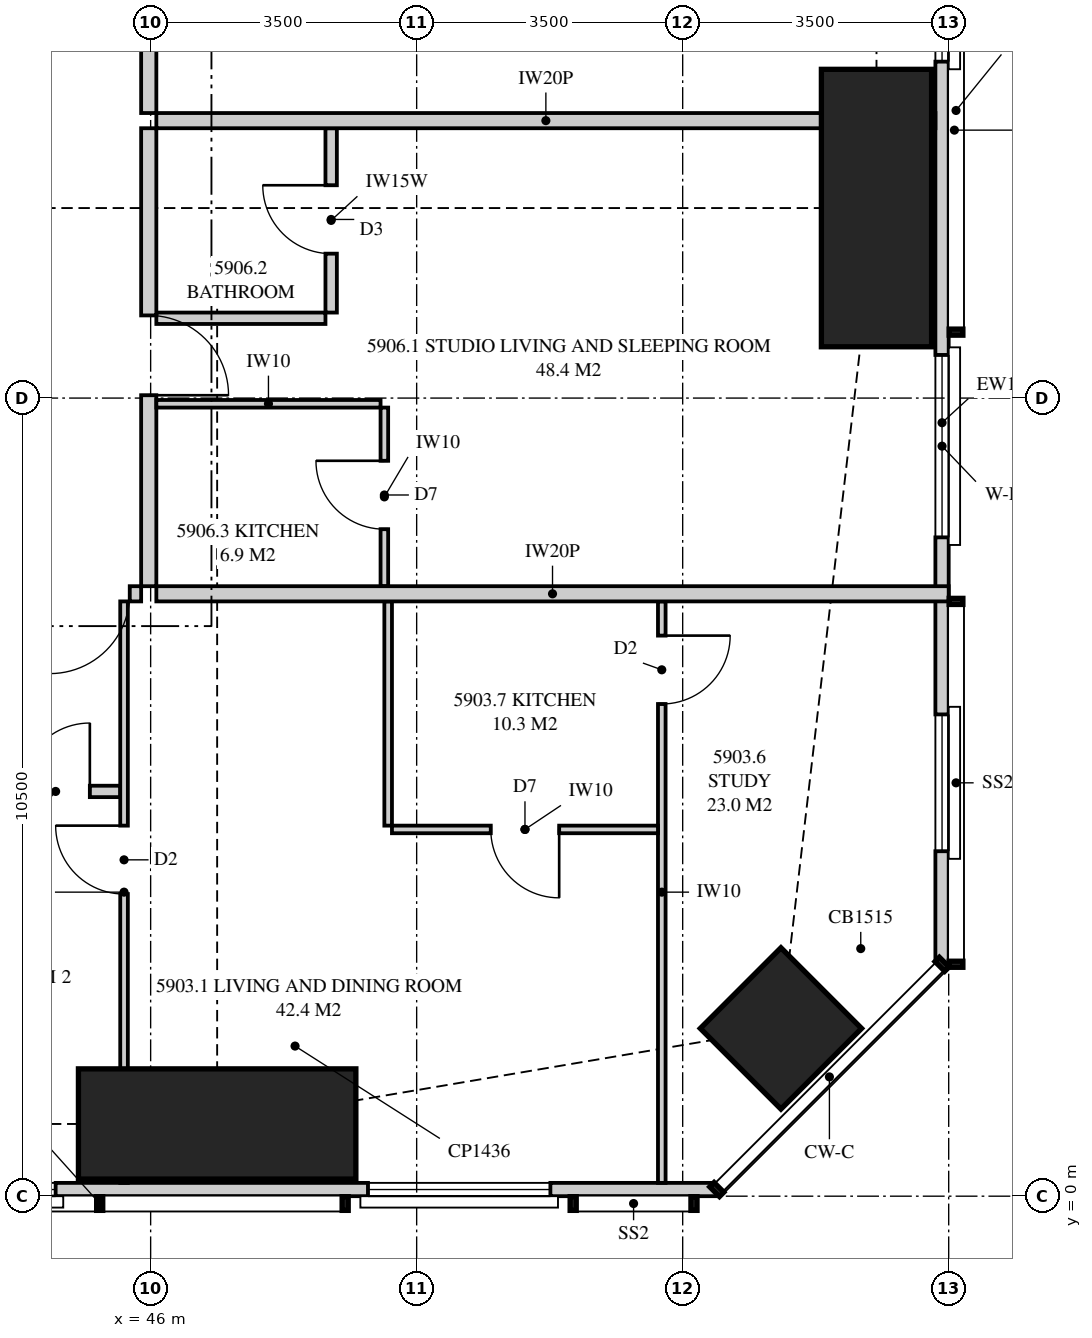
"""IFC4 building model, lengths in metres.
Left out: names, types, materials, properties, quantities, classifications, styles, units other than length and angle.
Written with IfcOpenShell. Run it as: python <this file> out.ifc"""

import sys

from ifc_helpers import new_model, si_unit, direction, frame, frame_2d, origin, origin_2d, place, context, subcontext, project, spatial, polyline, rectangle, hollow_rectangle, outline, extrude, element, fill, save


model = new_model("IFC4")
c1 = context("Model", 3, precision=1e-05, world=origin(), true_north=direction((0.0, 1.0)))
c2 = subcontext(c1, "Body", "Model", "MODEL_VIEW")
j1 = project(units=[si_unit("LENGTHUNIT", "METRE"), si_unit("PLANEANGLEUNIT", "RADIAN")], contexts=[c1])
p1 = place(None, origin())
s1 = spatial("IfcSite", under=j1, at=p1, CompositionType="ELEMENT")
p2 = place(p1, origin())
s2 = spatial("IfcBuilding", under=s1, at=p2, CompositionType="ELEMENT")
p3 = place(p2, frame((0.0, 0.0, 217.95)))
s3 = spatial("IfcBuildingStorey", under=s2, at=p3, CompositionType="ELEMENT", Elevation=217.95)
p4 = place(p3, frame((46.875, 0.95, 0.0), z_axis=(0.0, 0.0, 1.0), x_axis=(0.0, 1.0, 0.0)))
e1 = element("IfcColumn", 1, at=p4, inside=s3, PredefinedType="COLUMN", context=c2, shape_type="SweptSolid", body=[
    extrude(rectangle(XDim=1.45, YDim=3.65, at=origin_2d()), origin(), (0.0, 0.0, 1.0), 3.5),
])
p5 = place(p3, frame((54.293, 2.207, 0.0), z_axis=(0.0, 0.0, 1.0), x_axis=(-0.707106781187, 0.707106781187, 0.0)))
e2 = element("IfcColumn", 2, at=p5, inside=s3, PredefinedType="COLUMN", context=c2, shape_type="SweptSolid", body=[
    extrude(hollow_rectangle(XDim=1.5, YDim=1.5, WallThickness=0.125, at=origin_2d()), origin(), (0.0, 0.0, 1.0), 3.5),
])
p6 = place(p3, frame((55.55, 13.0, 0.0), z_axis=(0.0, 0.0, 1.0), x_axis=(1.0, 0.0, 0.0)))
e3 = element("IfcColumn", 3, at=p6, inside=s3, PredefinedType="COLUMN", context=c2, shape_type="SweptSolid", body=[
    extrude(rectangle(XDim=1.45, YDim=3.65, at=origin_2d()), origin(), (0.0, 0.0, 1.0), 3.5),
])
p7 = place(p3, frame((35.35, 0.087, 0.0), z_axis=(0.0, 0.0, 1.0), x_axis=(1.0, 0.0, 0.0)))
e4 = element("IfcWall", 4, at=p7, inside=s3, PredefinedType="SOLIDWALL", context=c2, shape_type="SweptSolid", body=[
    extrude(outline(polyline([(0.0, 0.0), (18.099, 0.0), (18.099, 3.26), (11.74, 3.26), (11.74, 2.3), (11.656, 2.3), (11.656, 3.26), (11.525, 3.26), (11.525, 2.3), (0.0, 2.3), (0.0, 0.0)])), frame((0.0, 0.087, 0.0), z_axis=(0.0, -1.0, 0.0), x_axis=(1.0, 0.0, 0.0)), (0.0, 0.0, 1.0), 0.175),
])
p8 = place(p7, frame((4.0, 0.0, 0.4)))
e5 = element("IfcOpeningElement", 5, at=p8, cuts=e4, PredefinedType="OPENING", context=c2, shape_type="SweptSolid", body=[
    extrude(rectangle(XDim=1.8, YDim=1.85, at=frame_2d((0.9, 0.925))), frame((0.0, 0.097, 0.0), z_axis=(0.0, -1.0, 0.0), x_axis=(1.0, 0.0, 0.0)), (0.0, 0.0, 1.0), 0.195),
])
p9 = place(p7, frame((7.6, 0.0, 0.4)))
e6 = element("IfcOpeningElement", 6, at=p9, cuts=e4, PredefinedType="OPENING", context=c2, shape_type="SweptSolid", body=[
    extrude(rectangle(XDim=1.8, YDim=1.85, at=frame_2d((0.9, 0.925))), frame((0.0, 0.097, 0.0), z_axis=(0.0, -1.0, 0.0), x_axis=(1.0, 0.0, 0.0)), (0.0, 0.0, 1.0), 0.195),
])
p10 = place(p7, frame((13.51, 0.0, 0.4)))
e7 = element("IfcOpeningElement", 7, at=p10, cuts=e4, PredefinedType="OPENING", context=c2, shape_type="SweptSolid", body=[
    extrude(rectangle(XDim=2.4, YDim=1.85, at=frame_2d((1.2, 0.925))), frame((0.0, 0.097, 0.0), z_axis=(0.0, -1.0, 0.0), x_axis=(1.0, 0.0, 0.0)), (0.0, 0.0, 1.0), 0.195),
])
p11 = place(p3, frame((56.413, 3.051, 0.0), z_axis=(0.0, 0.0, 1.0), x_axis=(0.0, 1.0, 0.0)))
e8 = element("IfcWall", 8, at=p11, inside=s3, PredefinedType="SOLIDWALL", context=c2, shape_type="SweptSolid", body=[
    extrude(outline(polyline([(0.0, 0.0), (14.249, 0.0), (14.249, 2.3), (9.949, 2.3), (9.949, 3.26), (9.858, 3.26), (9.858, 2.3), (9.688, 2.3), (9.688, 3.26), (0.0, 3.26), (0.0, 0.0)])), frame((0.0, 0.087, 0.0), z_axis=(0.0, -1.0, 0.0), x_axis=(1.0, 0.0, 0.0)), (0.0, 0.0, 1.0), 0.175),
])
p12 = place(p11, frame((1.487, 0.0, 0.4)))
e9 = element("IfcOpeningElement", 9, at=p12, cuts=e8, PredefinedType="OPENING", context=c2, shape_type="SweptSolid", body=[
    extrude(rectangle(XDim=1.8, YDim=1.85, at=frame_2d((0.9, 0.925))), frame((0.0, 0.097, 0.0), z_axis=(0.0, -1.0, 0.0), x_axis=(1.0, 0.0, 0.0)), (0.0, 0.0, 1.0), 0.195),
])
p13 = place(p11, frame((5.616, 0.0, 0.4)))
e10 = element("IfcOpeningElement", 10, at=p13, cuts=e8, PredefinedType="OPENING", context=c2, shape_type="SweptSolid", body=[
    extrude(rectangle(XDim=2.4, YDim=1.85, at=frame_2d((1.2, 0.925))), frame((0.0, 0.097, 0.0), z_axis=(0.0, -1.0, 0.0), x_axis=(1.0, 0.0, 0.0)), (0.0, 0.0, 1.0), 0.195),
])
p14 = place(p11, frame((11.875, 0.0, 0.4)))
e11 = element("IfcOpeningElement", 11, at=p14, cuts=e8, PredefinedType="OPENING", context=c2, shape_type="SweptSolid", body=[
    extrude(rectangle(XDim=1.8, YDim=1.85, at=frame_2d((0.9, 0.925))), frame((0.0, 0.097, 0.0), z_axis=(0.0, -1.0, 0.0), x_axis=(1.0, 0.0, 0.0)), (0.0, 0.0, 1.0), 0.195),
])
p15 = place(p3, frame((38.55, 7.925, 0.0), z_axis=(0.0, 0.0, 1.0), x_axis=(1.0, 0.0, 0.0)))
e12 = element("IfcWall", 12, at=p15, inside=s3, PredefinedType="PARTITIONING", context=c2, shape_type="SweptSolid", body=[
    extrude(outline(polyline([(0.0, 0.0), (7.325, 0.0), (7.325, 3.26), (7.325, 2.66), (7.015, 2.66), (7.015, 3.26), (0.01, 3.26), (0.01, 2.66), (0.0, 2.66), (0.0, 3.26), (0.0, 0.0)])), frame((0.0, 0.1, 0.0), z_axis=(0.0, -1.0, 0.0), x_axis=(1.0, 0.0, 0.0)), (0.0, 0.0, 1.0), 0.2),
])
p16 = place(p15, frame((6.125, 0.0, 0.0)))
e13 = element("IfcOpeningElement", 13, at=p16, cuts=e12, PredefinedType="OPENING", context=c2, shape_type="SweptSolid", body=[
    extrude(rectangle(XDim=1.05, YDim=2.2, at=frame_2d((0.525, 1.1))), frame((0.0, 0.11, 0.0), z_axis=(0.0, -1.0, 0.0), x_axis=(1.0, 0.0, 0.0)), (0.0, 0.0, 1.0), 0.22),
])
p17 = place(p3, frame((45.65, 0.175, 0.0), z_axis=(0.0, 0.0, 1.0), x_axis=(0.0, 1.0, 0.0)))
e14 = element("IfcWall", 14, at=p17, inside=s3, PredefinedType="PARTITIONING", context=c2, shape_type="SweptSolid", body=[
    extrude(outline(polyline([(0.529, 2.3), (0.0, 2.3), (0.0, 0.0), (0.529, 0.0), (0.529, 0.13), (1.021, 0.13), (1.021, 0.0), (7.65, 0.0), (7.65, 2.66), (1.635, 2.66), (1.635, 2.3), (1.021, 2.3), (1.021, 2.02), (0.529, 2.02), (0.529, 2.3)])), frame((0.0, 0.05, 0.0), z_axis=(0.0, -1.0, 0.0), x_axis=(1.0, 0.0, 0.0)), (0.0, 0.0, 1.0), 0.1),
])
p18 = place(p17, frame((3.8, 0.0, 0.0)))
e15 = element("IfcOpeningElement", 15, at=p18, cuts=e14, PredefinedType="OPENING", context=c2, shape_type="SweptSolid", body=[
    extrude(rectangle(XDim=0.9, YDim=2.1, at=frame_2d((0.45, 1.05))), frame((0.0, 0.06, 0.0), z_axis=(0.0, -1.0, 0.0), x_axis=(1.0, 0.0, 0.0)), (0.0, 0.0, 1.0), 0.12),
])
p19 = place(p3, frame((42.1, 5.325, 0.0), z_axis=(0.0, 0.0, 1.0), x_axis=(1.0, 0.0, 0.0)))
e16 = element("IfcWall", 16, at=p19, inside=s3, PredefinedType="PLUMBINGWALL", context=c2, shape_type="SweptSolid", body=[
    extrude(outline(polyline([(0.0, 0.0), (3.5, 0.0), (3.5, 3.26), (3.5, 2.66), (3.49, 2.66), (3.49, 3.26), (0.0, 3.26), (0.0, 0.0)])), frame((0.0, 0.075, 0.0), z_axis=(0.0, -1.0, 0.0), x_axis=(1.0, 0.0, 0.0)), (0.0, 0.0, 1.0), 0.15),
])
p20 = place(p19, frame((2.2, 0.0, 0.0)))
e17 = element("IfcOpeningElement", 17, at=p20, cuts=e16, PredefinedType="OPENING", context=c2, shape_type="SweptSolid", body=[
    extrude(rectangle(XDim=0.9, YDim=2.1, at=frame_2d((0.45, 1.05))), frame((0.0, 0.085, 0.0), z_axis=(0.0, -1.0, 0.0), x_axis=(1.0, 0.0, 0.0)), (0.0, 0.0, 1.0), 0.17),
])
p21 = place(p3, frame((52.725, 0.175, 0.0), z_axis=(0.0, 0.0, 1.0), x_axis=(0.0, 1.0, 0.0)))
e18 = element("IfcWall", 18, at=p21, inside=s3, PredefinedType="PARTITIONING", context=c2, shape_type="SweptSolid", body=[
    extrude(outline(polyline([(0.0, 0.0), (7.65, 0.0), (7.65, 3.26), (2.639, 3.26), (2.639, 2.3), (0.894, 2.3), (0.894, 3.26), (0.0, 3.26), (0.0, 0.0)])), frame((0.0, 0.05, 0.0), z_axis=(0.0, -1.0, 0.0), x_axis=(1.0, 0.0, 0.0)), (0.0, 0.0, 1.0), 0.1),
])
p22 = place(p21, frame((6.3, 0.0, 0.0)))
e19 = element("IfcOpeningElement", 19, at=p22, cuts=e18, PredefinedType="OPENING", context=c2, shape_type="SweptSolid", body=[
    extrude(rectangle(XDim=0.9, YDim=2.1, at=frame_2d((0.45, 1.05))), frame((0.0, 0.06, 0.0), z_axis=(0.0, -1.0, 0.0), x_axis=(1.0, 0.0, 0.0)), (0.0, 0.0, 1.0), 0.12),
])
p23 = place(p3, frame((49.175, 4.825, 0.0), z_axis=(0.0, 0.0, 1.0), x_axis=(1.0, 0.0, 0.0)))
e20 = element("IfcWall", 20, at=p23, inside=s3, PredefinedType="PARTITIONING", context=c2, shape_type="SweptSolid", body=[
    extrude(rectangle(XDim=3.5, YDim=0.1, at=frame_2d((1.75, 0.0))), origin(), (0.0, 0.0, 1.0), 3.26),
])
p24 = place(p23, frame((1.3, 0.0, 0.0)))
e21 = element("IfcOpeningElement", 21, at=p24, cuts=e20, PredefinedType="OPENING", context=c2, shape_type="SweptSolid", body=[
    extrude(rectangle(XDim=0.9, YDim=2.1, at=frame_2d((0.45, 1.05))), frame((0.0, 0.06, 0.0), z_axis=(0.0, -1.0, 0.0), x_axis=(1.0, 0.0, 0.0)), (0.0, 0.0, 1.0), 0.12),
])
p25 = place(p3, frame((49.125, 4.875, 0.0), z_axis=(0.0, 0.0, 1.0), x_axis=(0.0, 1.0, 0.0)))
e22 = element("IfcWall", 22, at=p25, inside=s3, PredefinedType="PARTITIONING", context=c2, shape_type="SweptSolid", body=[
    extrude(rectangle(XDim=2.95, YDim=0.1, at=frame_2d((1.475, 0.0))), origin(), (0.0, 0.0, 1.0), 3.26),
])
p26 = place(p3, frame((46.075, 7.925, 0.0), z_axis=(0.0, 0.0, 1.0), x_axis=(1.0, 0.0, 0.0)))
e23 = element("IfcWall", 23, at=p26, inside=s3, PredefinedType="PARTITIONING", context=c2, shape_type="SweptSolid", body=[
    extrude(outline(polyline([(0.0, 0.0), (10.425, 0.0), (10.425, 3.26), (9.8, 3.26), (9.8, 2.3), (7.968, 2.3), (7.968, 3.26), (2.11, 3.26), (2.11, 2.66), (0.0, 2.66), (0.0, 3.26), (0.0, 0.0)])), frame((0.0, 0.1, 0.0), z_axis=(0.0, -1.0, 0.0), x_axis=(1.0, 0.0, 0.0)), (0.0, 0.0, 1.0), 0.2),
])
p27 = place(p3, frame((56.325, 14.15, 0.0), z_axis=(0.0, 0.0, 1.0), x_axis=(-1.0, 0.0, 0.0)))
e24 = element("IfcWall", 24, at=p27, inside=s3, PredefinedType="PARTITIONING", context=c2, shape_type="SweptSolid", body=[
    extrude(outline(polyline([(0.529, 2.3), (0.0, 2.3), (0.0, 0.0), (0.529, 0.0), (0.529, 0.28), (1.021, 0.28), (1.021, 0.0), (10.25, 0.0), (10.25, 2.66), (1.685, 2.66), (1.685, 2.3), (1.021, 2.3), (1.021, 1.87), (0.529, 1.87), (0.529, 2.3)])), frame((0.0, 0.1, 0.0), z_axis=(0.0, -1.0, 0.0), x_axis=(1.0, 0.0, 0.0)), (0.0, 0.0, 1.0), 0.2),
])
p28 = place(p3, frame((45.975, 8.025, 0.0), z_axis=(0.0, 0.0, 1.0), x_axis=(0.0, 1.0, 0.0)))
e25 = element("IfcWall", 25, at=p28, inside=s3, PredefinedType="PARTITIONING", context=c2, shape_type="SweptSolid", body=[
    extrude(outline(polyline([(0.0, 0.0), (6.025, 0.0), (6.025, 3.26), (6.025, 2.66), (5.085, 2.66), (0.0, 2.66), (0.0, 3.26), (0.0, 0.0)])), frame((0.0, 0.1, 0.0), z_axis=(0.0, -1.0, 0.0), x_axis=(1.0, 0.0, 0.0)), (0.0, 0.0, 1.0), 0.2),
])
p29 = place(p28, frame((2.512, 0.0, 0.0)))
e26 = element("IfcOpeningElement", 26, at=p29, cuts=e25, PredefinedType="OPENING", context=c2, shape_type="SweptSolid", body=[
    extrude(rectangle(XDim=1.05, YDim=2.2, at=frame_2d((0.525, 1.1))), frame((0.0, 0.11, 0.0), z_axis=(0.0, -1.0, 0.0), x_axis=(1.0, 0.0, 0.0)), (0.0, 0.0, 1.0), 0.22),
])
p30 = place(p3, frame((48.375, 11.625, 0.0), z_axis=(0.0, 0.0, 1.0), x_axis=(0.0, 1.0, 0.0)))
e27 = element("IfcWall", 27, at=p30, inside=s3, PredefinedType="PLUMBINGWALL", context=c2, shape_type="SweptSolid", body=[
    extrude(outline(polyline([(0.0, 0.0), (2.425, 0.0), (2.425, 3.26), (2.425, 2.66), (0.09, 2.66), (0.09, 3.26), (0.0, 3.26), (0.0, 0.0)])), frame((0.0, 0.075, 0.0), z_axis=(0.0, -1.0, 0.0), x_axis=(1.0, 0.0, 0.0)), (0.0, 0.0, 1.0), 0.15),
])
p31 = place(p30, frame((0.775, 0.0, 0.0)))
e28 = element("IfcOpeningElement", 28, at=p31, cuts=e27, PredefinedType="OPENING", context=c2, shape_type="SweptSolid", body=[
    extrude(rectangle(XDim=0.9, YDim=2.1, at=frame_2d((0.45, 1.05))), frame((0.0, 0.085, 0.0), z_axis=(0.0, -1.0, 0.0), x_axis=(1.0, 0.0, 0.0)), (0.0, 0.0, 1.0), 0.17),
])
p32 = place(p3, frame((48.3, 11.55, 0.0), z_axis=(0.0, 0.0, 1.0), x_axis=(-1.0, 0.0, 0.0)))
e29 = element("IfcWall", 29, at=p32, inside=s3, PredefinedType="PLUMBINGWALL", context=c2, shape_type="SweptSolid", body=[
    extrude(outline(polyline([(0.0, 0.0), (2.225, 0.0), (2.225, 3.26), (2.225, 2.66), (0.14, 2.66), (0.14, 3.26), (0.0, 3.26), (0.0, 0.0)])), frame((0.0, 0.075, 0.0), z_axis=(0.0, -1.0, 0.0), x_axis=(1.0, 0.0, 0.0)), (0.0, 0.0, 1.0), 0.15),
])
p33 = place(p3, frame((49.075, 8.025, 0.0), z_axis=(0.0, 0.0, 1.0), x_axis=(0.0, 1.0, 0.0)))
e30 = element("IfcWall", 30, at=p33, inside=s3, PredefinedType="PARTITIONING", context=c2, shape_type="SweptSolid", body=[
    extrude(rectangle(XDim=2.35, YDim=0.1, at=frame_2d((1.175, 0.0))), origin(), (0.0, 0.0, 1.0), 3.26),
])
p34 = place(p33, frame((0.75, 0.0, 0.0)))
e31 = element("IfcOpeningElement", 31, at=p34, cuts=e30, PredefinedType="OPENING", context=c2, shape_type="SweptSolid", body=[
    extrude(rectangle(XDim=0.9, YDim=2.1, at=frame_2d((0.45, 1.05))), frame((0.0, 0.06, 0.0), z_axis=(0.0, -1.0, 0.0), x_axis=(1.0, 0.0, 0.0)), (0.0, 0.0, 1.0), 0.12),
])
p35 = place(p3, frame((49.025, 10.425, 0.0), z_axis=(0.0, 0.0, 1.0), x_axis=(-1.0, 0.0, 0.0)))
e32 = element("IfcWall", 32, at=p35, inside=s3, PredefinedType="PARTITIONING", context=c2, shape_type="SweptSolid", body=[
    extrude(outline(polyline([(0.0, 0.0), (2.95, 0.0), (2.95, 3.26), (2.95, 2.66), (0.89, 2.66), (0.89, 3.26), (0.0, 3.26), (0.0, 0.0)])), frame((0.0, 0.05, 0.0), z_axis=(0.0, -1.0, 0.0), x_axis=(1.0, 0.0, 0.0)), (0.0, 0.0, 1.0), 0.1),
])
p36 = place(p3, frame((45.975, 14.25, 0.0), z_axis=(0.0, 0.0, 1.0), x_axis=(0.0, 1.0, 0.0)))
e33 = element("IfcWall", 33, at=p36, inside=s3, PredefinedType="PARTITIONING", context=c2, shape_type="SweptSolid", body=[
    extrude(outline(polyline([(0.0, 0.0), (8.0, 0.0), (8.0, 3.26), (5.81, 3.26), (5.81, 2.66), (3.19, 2.66), (3.19, 3.26), (0.06, 3.26), (0.06, 2.66), (0.0, 2.66), (0.0, 3.26), (0.0, 0.0)])), frame((0.0, 0.1, 0.0), z_axis=(0.0, -1.0, 0.0), x_axis=(1.0, 0.0, 0.0)), (0.0, 0.0, 1.0), 0.2),
])
p37 = place(p36, frame((3.5, 0.0, 0.0)))
e34 = element("IfcOpeningElement", 34, at=p37, cuts=e33, PredefinedType="OPENING", context=c2, shape_type="SweptSolid", body=[
    extrude(rectangle(XDim=1.05, YDim=2.2, at=frame_2d((0.525, 1.1))), frame((0.0, 0.11, 0.0), z_axis=(0.0, -1.0, 0.0), x_axis=(1.0, 0.0, 0.0)), (0.0, 0.0, 1.0), 0.22),
])
p38 = place(p9, origin())
e35 = element("IfcWindow", 35, at=p38, inside=s3, PartitioningType="SINGLE_PANEL", PredefinedType="WINDOW", context=c2, shape_type="SweptSolid", body=[
    extrude(rectangle(XDim=1.8, YDim=1.85, at=frame_2d((0.9, 0.925))), frame((0.0, 0.03, 0.0), z_axis=(0.0, -1.0, 0.0), x_axis=(1.0, 0.0, 0.0)), (0.0, 0.0, 1.0), 0.06),
])
fill(e6, e35)
p39 = place(p10, origin())
e36 = element("IfcWindow", 36, at=p39, inside=s3, PartitioningType="SINGLE_PANEL", PredefinedType="WINDOW", context=c2, shape_type="SweptSolid", body=[
    extrude(rectangle(XDim=2.4, YDim=1.85, at=frame_2d((1.2, 0.925))), frame((0.0, 0.03, 0.0), z_axis=(0.0, -1.0, 0.0), x_axis=(1.0, 0.0, 0.0)), (0.0, 0.0, 1.0), 0.06),
])
fill(e7, e36)
p40 = place(p12, origin())
e37 = element("IfcWindow", 37, at=p40, inside=s3, PartitioningType="SINGLE_PANEL", PredefinedType="WINDOW", context=c2, shape_type="SweptSolid", body=[
    extrude(rectangle(XDim=1.8, YDim=1.85, at=frame_2d((0.9, 0.925))), frame((0.0, 0.03, 0.0), z_axis=(0.0, -1.0, 0.0), x_axis=(1.0, 0.0, 0.0)), (0.0, 0.0, 1.0), 0.06),
])
fill(e9, e37)
p41 = place(p13, origin())
e38 = element("IfcWindow", 38, at=p41, inside=s3, PartitioningType="SINGLE_PANEL", PredefinedType="WINDOW", context=c2, shape_type="SweptSolid", body=[
    extrude(rectangle(XDim=2.4, YDim=1.85, at=frame_2d((1.2, 0.925))), frame((0.0, 0.03, 0.0), z_axis=(0.0, -1.0, 0.0), x_axis=(1.0, 0.0, 0.0)), (0.0, 0.0, 1.0), 0.06),
])
fill(e10, e38)
p42 = place(p14, origin())
e39 = element("IfcWindow", 39, at=p42, inside=s3, PartitioningType="SINGLE_PANEL", PredefinedType="WINDOW", context=c2, shape_type="SweptSolid", body=[
    extrude(rectangle(XDim=1.8, YDim=1.85, at=frame_2d((0.9, 0.925))), frame((0.0, 0.03, 0.0), z_axis=(0.0, -1.0, 0.0), x_axis=(1.0, 0.0, 0.0)), (0.0, 0.0, 1.0), 0.06),
])
fill(e11, e39)
p43 = place(p16, frame((1.05, 0.0, 0.0), z_axis=(0.0, 0.0, 1.0), x_axis=(-1.0, 0.0, 0.0)))
e40 = element("IfcDoor", 40, at=p43, inside=s3, OperationType="SINGLE_SWING_RIGHT", PredefinedType="DOOR", context=c2, shape_type="SweptSolid", body=[
    extrude(rectangle(XDim=1.05, YDim=2.2, at=frame_2d((0.525, 1.1))), frame((0.0, 0.025, 0.0), z_axis=(0.0, -1.0, 0.0), x_axis=(1.0, 0.0, 0.0)), (0.0, 0.0, 1.0), 0.05),
])
fill(e13, e40)
p44 = place(p18, origin())
e41 = element("IfcDoor", 41, at=p44, inside=s3, OperationType="SINGLE_SWING_RIGHT", PredefinedType="DOOR", context=c2, shape_type="SweptSolid", body=[
    extrude(rectangle(XDim=0.9, YDim=2.1, at=frame_2d((0.45, 1.05))), frame((0.0, 0.025, 0.0), z_axis=(0.0, -1.0, 0.0), x_axis=(1.0, 0.0, 0.0)), (0.0, 0.0, 1.0), 0.05),
])
fill(e15, e41)
p45 = place(p20, origin())
e42 = element("IfcDoor", 42, at=p45, inside=s3, OperationType="SINGLE_SWING_RIGHT", PredefinedType="DOOR", context=c2, shape_type="SweptSolid", body=[
    extrude(rectangle(XDim=0.9, YDim=2.1, at=frame_2d((0.45, 1.05))), frame((0.0, 0.025, 0.0), z_axis=(0.0, -1.0, 0.0), x_axis=(1.0, 0.0, 0.0)), (0.0, 0.0, 1.0), 0.05),
])
fill(e17, e42)
p46 = place(p22, frame((0.9, 0.0, 0.0), z_axis=(0.0, 0.0, 1.0), x_axis=(-1.0, 0.0, 0.0)))
e43 = element("IfcDoor", 43, at=p46, inside=s3, OperationType="SINGLE_SWING_LEFT", PredefinedType="DOOR", context=c2, shape_type="SweptSolid", body=[
    extrude(rectangle(XDim=0.9, YDim=2.1, at=frame_2d((0.45, 1.05))), frame((0.0, 0.025, 0.0), z_axis=(0.0, -1.0, 0.0), x_axis=(1.0, 0.0, 0.0)), (0.0, 0.0, 1.0), 0.05),
])
fill(e19, e43)
p47 = place(p24, frame((0.9, 0.0, 0.0), z_axis=(0.0, 0.0, 1.0), x_axis=(-1.0, 0.0, 0.0)))
e44 = element("IfcDoor", 44, at=p47, inside=s3, OperationType="SINGLE_SWING_LEFT", PredefinedType="DOOR", context=c2, shape_type="SweptSolid", body=[
    extrude(rectangle(XDim=0.9, YDim=2.1, at=frame_2d((0.45, 1.05))), frame((0.0, 0.025, 0.0), z_axis=(0.0, -1.0, 0.0), x_axis=(1.0, 0.0, 0.0)), (0.0, 0.0, 1.0), 0.05),
])
fill(e21, e44)
p48 = place(p29, frame((1.05, 0.0, 0.0), z_axis=(0.0, 0.0, 1.0), x_axis=(-1.0, 0.0, 0.0)))
e45 = element("IfcDoor", 45, at=p48, inside=s3, OperationType="SINGLE_SWING_RIGHT", PredefinedType="DOOR", context=c2, shape_type="SweptSolid", body=[
    extrude(rectangle(XDim=1.05, YDim=2.2, at=frame_2d((0.525, 1.1))), frame((0.0, 0.025, 0.0), z_axis=(0.0, -1.0, 0.0), x_axis=(1.0, 0.0, 0.0)), (0.0, 0.0, 1.0), 0.05),
])
fill(e26, e45)
p49 = place(p31, origin())
e46 = element("IfcDoor", 46, at=p49, inside=s3, OperationType="SINGLE_SWING_RIGHT", PredefinedType="DOOR", context=c2, shape_type="SweptSolid", body=[
    extrude(rectangle(XDim=0.9, YDim=2.1, at=frame_2d((0.45, 1.05))), frame((0.0, 0.025, 0.0), z_axis=(0.0, -1.0, 0.0), x_axis=(1.0, 0.0, 0.0)), (0.0, 0.0, 1.0), 0.05),
])
fill(e28, e46)
p50 = place(p34, origin())
e47 = element("IfcDoor", 47, at=p50, inside=s3, OperationType="SINGLE_SWING_RIGHT", PredefinedType="DOOR", context=c2, shape_type="SweptSolid", body=[
    extrude(rectangle(XDim=0.9, YDim=2.1, at=frame_2d((0.45, 1.05))), frame((0.0, 0.025, 0.0), z_axis=(0.0, -1.0, 0.0), x_axis=(1.0, 0.0, 0.0)), (0.0, 0.0, 1.0), 0.05),
])
fill(e31, e47)
save(model, sys.argv[1])
